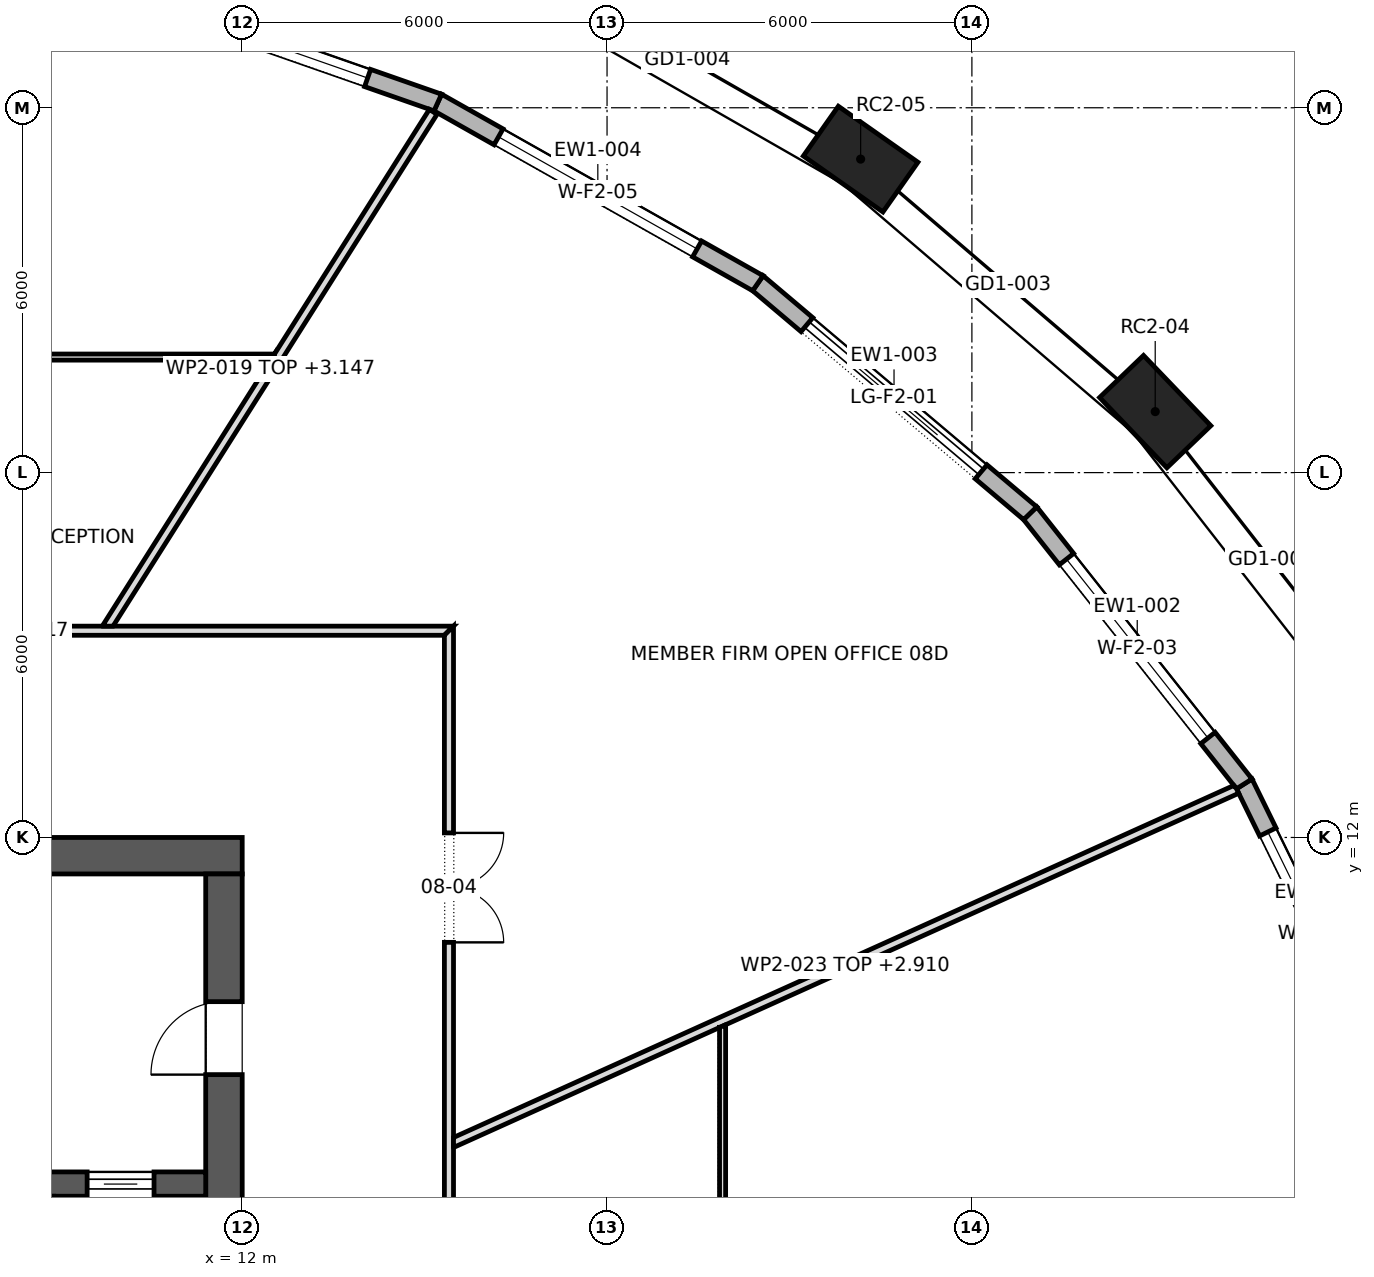
"""IFC4 building model, lengths in metres.
Left out: names, types, materials, properties, quantities, classifications, styles, units other than length and angle.
Written with IfcOpenShell. Run it as: python <this file> out.ifc"""

import sys

from ifc_helpers import new_model, si_unit, direction, frame, frame_2d, origin, origin_2d, place, context, subcontext, project, spatial, polyline, rectangle, outline, extrude, element, fill, save


model = new_model("IFC4")
c1 = context("Model", 3, precision=1e-05, world=origin(), true_north=direction((0.0, 1.0)))
c2 = subcontext(c1, "Body", "Model", "MODEL_VIEW")
j1 = project(units=[si_unit("LENGTHUNIT", "METRE"), si_unit("PLANEANGLEUNIT", "RADIAN")], contexts=[c1])
p1 = place(None, origin())
s1 = spatial("IfcSite", under=j1, at=p1, CompositionType="ELEMENT")
p2 = place(p1, origin())
s2 = spatial("IfcBuilding", under=s1, at=p2, CompositionType="ELEMENT")
p3 = place(p2, frame((0.0, 0.0, 117.1)))
s3 = spatial("IfcBuildingStorey", under=s2, at=p3, CompositionType="ELEMENT", Elevation=117.1)
for number, where, z_axis, x_axis in (
    (1, (27.015, 19.003, 0.0), (0.0, 0.0, 1.0), (-0.692, 0.722, 0.0)),
    (2, (22.17, 23.156, 0.0), (0.0, 0.0, 1.0), (-0.818, 0.575, 0.0)),
):
    element("IfcColumn", number, at=place(p3, frame(where, z_axis=z_axis, x_axis=x_axis)), inside=s3, PredefinedType="COLUMN", context=c2, shape_type="SweptSolid", body=[
        extrude(rectangle(XDim=1.6, YDim=1.0, at=origin_2d()), origin(), (0.0, 0.0, 1.0), 4.2),
    ])
p4 = place(p3, frame((-12.0, 11.7, 0.0), z_axis=(0.0, 0.0, 1.0), x_axis=(1.0, 0.0, 0.0)))
e3 = element("IfcWall", 3, at=p4, inside=s3, PredefinedType="SHEAR", context=c2, shape_type="SweptSolid", body=[
    extrude(rectangle(XDim=24.0, YDim=0.6, at=frame_2d((12.0, 0.0))), origin(), (0.0, 0.0, 1.0), 4.2),
])
p5 = place(p4, frame((9.225, 0.0, 0.0)))
e4 = element("IfcOpeningElement", 4, at=p5, cuts=e3, PredefinedType="OPENING", context=c2, shape_type="SweptSolid", body=[
    extrude(rectangle(XDim=0.9, YDim=2.1, at=frame_2d((0.45, 1.05))), frame((0.0, 0.312, 0.0), z_axis=(0.0, -1.0, 0.0), x_axis=(1.0, 0.0, 0.0)), (0.0, 0.0, 1.0), 0.624),
])
p6 = place(p4, frame((10.925, 0.0, 0.0)))
e5 = element("IfcOpeningElement", 5, at=p6, cuts=e3, PredefinedType="OPENING", context=c2, shape_type="SweptSolid", body=[
    extrude(rectangle(XDim=0.8, YDim=2.1, at=frame_2d((0.4, 1.05))), frame((0.0, 0.312, 0.0), z_axis=(0.0, -1.0, 0.0), x_axis=(1.0, 0.0, 0.0)), (0.0, 0.0, 1.0), 0.624),
])
p7 = place(p4, frame((4.2, 0.0, 0.0)))
e6 = element("IfcOpeningElement", 6, at=p7, cuts=e3, PredefinedType="OPENING", context=c2, shape_type="SweptSolid", body=[
    extrude(rectangle(XDim=0.8, YDim=2.1, at=frame_2d((0.4, 1.05))), frame((0.0, 0.312, 0.0), z_axis=(0.0, -1.0, 0.0), x_axis=(1.0, 0.0, 0.0)), (0.0, 0.0, 1.0), 0.624),
])
p8 = place(p4, frame((13.8, 0.0, 0.0)))
e7 = element("IfcOpeningElement", 7, at=p8, cuts=e3, PredefinedType="OPENING", context=c2, shape_type="SweptSolid", body=[
    extrude(rectangle(XDim=0.8, YDim=2.1, at=frame_2d((0.4, 1.05))), frame((0.0, 0.312, 0.0), z_axis=(0.0, -1.0, 0.0), x_axis=(1.0, 0.0, 0.0)), (0.0, 0.0, 1.0), 0.624),
])
p9 = place(p4, frame((16.6, 0.0, 0.0)))
e8 = element("IfcOpeningElement", 8, at=p9, cuts=e3, PredefinedType="OPENING", context=c2, shape_type="SweptSolid", body=[
    extrude(rectangle(XDim=0.8, YDim=2.1, at=frame_2d((0.4, 1.05))), frame((0.0, 0.312, 0.0), z_axis=(0.0, -1.0, 0.0), x_axis=(1.0, 0.0, 0.0)), (0.0, 0.0, 1.0), 0.624),
])
p10 = place(p3, frame((11.7, -11.4, 0.0), z_axis=(0.0, 0.0, 1.0), x_axis=(0.0, 1.0, 0.0)))
e9 = element("IfcWall", 9, at=p10, inside=s3, PredefinedType="SHEAR", context=c2, shape_type="SweptSolid", body=[
    extrude(rectangle(XDim=22.8, YDim=0.6, at=frame_2d((11.4, 0.0))), origin(), (0.0, 0.0, 1.0), 4.2),
])
p11 = place(p10, frame((10.2, 0.0, 0.0)))
e10 = element("IfcOpeningElement", 10, at=p11, cuts=e9, PredefinedType="OPENING", context=c2, shape_type="SweptSolid", body=[
    extrude(rectangle(XDim=2.4, YDim=2.1, at=frame_2d((1.2, 1.05))), frame((0.0, 0.312, 0.0), z_axis=(0.0, -1.0, 0.0), x_axis=(1.0, 0.0, 0.0)), (0.0, 0.0, 1.0), 0.624),
])
p12 = place(p10, frame((19.5, 0.0, 0.0)))
e11 = element("IfcOpeningElement", 11, at=p12, cuts=e9, PredefinedType="OPENING", context=c2, shape_type="SweptSolid", body=[
    extrude(rectangle(XDim=1.2, YDim=2.1, at=frame_2d((0.6, 1.05))), frame((0.0, 0.312, 0.0), z_axis=(0.0, -1.0, 0.0), x_axis=(1.0, 0.0, 0.0)), (0.0, 0.0, 1.0), 0.624),
])
p13 = place(p10, frame((2.1, 0.0, 0.0)))
e12 = element("IfcOpeningElement", 12, at=p13, cuts=e9, PredefinedType="OPENING", context=c2, shape_type="SweptSolid", body=[
    extrude(rectangle(XDim=1.2, YDim=2.1, at=frame_2d((0.6, 1.05))), frame((0.0, 0.312, 0.0), z_axis=(0.0, -1.0, 0.0), x_axis=(1.0, 0.0, 0.0)), (0.0, 0.0, 1.0), 0.624),
])
p14 = place(p3, frame((-11.4, 6.3, 0.0), z_axis=(0.0, 0.0, 1.0), x_axis=(1.0, 0.0, 0.0)))
e13 = element("IfcWall", 13, at=p14, inside=s3, PredefinedType="SHEAR", context=c2, shape_type="SweptSolid", body=[
    extrude(rectangle(XDim=22.8, YDim=0.4, at=frame_2d((11.4, 0.0))), origin(), (0.0, 0.0, 1.0), 4.2),
])
p15 = place(p14, frame((20.85, 0.0, 0.0)))
e14 = element("IfcOpeningElement", 14, at=p15, cuts=e13, PredefinedType="OPENING", context=c2, shape_type="SweptSolid", body=[
    extrude(rectangle(XDim=1.1, YDim=2.1, at=frame_2d((0.55, 1.05))), frame((0.0, 0.212, 0.0), z_axis=(0.0, -1.0, 0.0), x_axis=(1.0, 0.0, 0.0)), (0.0, 0.0, 1.0), 0.424),
])
p16 = place(p3, frame((8.75, 3.2, 0.0), z_axis=(0.0, 0.0, 1.0), x_axis=(0.0, 1.0, 0.0)))
e15 = element("IfcWall", 15, at=p16, inside=s3, PredefinedType="SHEAR", context=c2, shape_type="SweptSolid", body=[
    extrude(rectangle(XDim=2.9, YDim=0.3, at=frame_2d((1.45, 0.0))), origin(), (0.0, 0.0, 1.0), 4.2),
])
p17 = place(p3, frame((30.905, 7.934, 0.0), z_axis=(0.0, 0.0, 1.0), x_axis=(-0.440306401535, 0.897847577692, 0.0)))
e16 = element("IfcWall", 16, at=p17, inside=s3, PredefinedType="STANDARD", context=c2, shape_type="SweptSolid", body=[
    extrude(outline(polyline([(-0.017, -0.15), (5.527, -0.15), (5.494, 0.15), (0.017, 0.15), (-0.017, -0.15)])), origin(), (0.0, 0.0, 1.0), 3.9),
])
p18 = place(p17, frame((0.88, 0.0, 0.6)))
e17 = element("IfcOpeningElement", 17, at=p18, cuts=e16, PredefinedType="OPENING", context=c2, shape_type="SweptSolid", body=[
    extrude(rectangle(XDim=3.75, YDim=2.85, at=frame_2d((1.875, 1.425))), frame((0.0, 0.162, 0.0), z_axis=(0.0, -1.0, 0.0), x_axis=(1.0, 0.0, 0.0)), (0.0, 0.0, 1.0), 0.324),
])
p19 = place(p3, frame((28.479, 12.881, 0.0), z_axis=(0.0, 0.0, 1.0), x_axis=(-0.62038332391, 0.784298751379, 0.0)))
e18 = element("IfcWall", 18, at=p19, inside=s3, PredefinedType="STANDARD", context=c2, shape_type="SweptSolid", body=[
    extrude(outline(polyline([(-0.016, -0.15), (5.69, -0.15), (5.66, 0.15), (0.016, 0.15), (-0.016, -0.15)])), origin(), (0.0, 0.0, 1.0), 3.9),
])
p20 = place(p19, frame((0.962, 0.0, 0.6)))
e19 = element("IfcOpeningElement", 19, at=p20, cuts=e18, PredefinedType="OPENING", context=c2, shape_type="SweptSolid", body=[
    extrude(rectangle(XDim=3.75, YDim=2.85, at=frame_2d((1.875, 1.425))), frame((0.0, 0.162, 0.0), z_axis=(0.0, -1.0, 0.0), x_axis=(1.0, 0.0, 0.0)), (0.0, 0.0, 1.0), 0.324),
])
p21 = place(p3, frame((24.958, 17.332, 0.0), z_axis=(0.0, 0.0, 1.0), x_axis=(-0.763937302001, 0.645290476151, 0.0)))
e20 = element("IfcWall", 20, at=p21, inside=s3, PredefinedType="STANDARD", context=c2, shape_type="SweptSolid", body=[
    extrude(outline(polyline([(-0.015, -0.15), (5.876, -0.15), (5.848, 0.15), (0.015, 0.15), (-0.015, -0.15)])), origin(), (0.0, 0.0, 1.0), 3.9),
])
p22 = place(p21, frame((1.056, 0.0, 0.0)))
e21 = element("IfcOpeningElement", 21, at=p22, cuts=e20, PredefinedType="OPENING", context=c2, shape_type="SweptSolid", body=[
    extrude(rectangle(XDim=3.75, YDim=3.45, at=frame_2d((1.875, 1.725))), frame((0.0, 0.162, 0.0), z_axis=(0.0, -1.0, 0.0), x_axis=(1.0, 0.0, 0.0)), (0.0, 0.0, 1.0), 0.324),
])
p23 = place(p3, frame((20.48, 21.115, 0.0), z_axis=(0.0, 0.0, 1.0), x_axis=(-0.870858332497, 0.491534093142, 0.0)))
e22 = element("IfcWall", 22, at=p23, inside=s3, PredefinedType="STANDARD", context=c2, shape_type="SweptSolid", body=[
    extrude(outline(polyline([(-0.014, -0.15), (6.058, -0.15), (6.031, 0.15), (0.014, 0.15), (-0.014, -0.15)])), origin(), (0.0, 0.0, 1.0), 3.9),
])
p24 = place(p23, frame((1.147, 0.0, 0.6)))
e23 = element("IfcOpeningElement", 23, at=p24, cuts=e22, PredefinedType="OPENING", context=c2, shape_type="SweptSolid", body=[
    extrude(rectangle(XDim=3.75, YDim=2.85, at=frame_2d((1.875, 1.425))), frame((0.0, 0.162, 0.0), z_axis=(0.0, -1.0, 0.0), x_axis=(1.0, 0.0, 0.0)), (0.0, 0.0, 1.0), 0.324),
])
p25 = place(p3, frame((15.216, 24.086, 0.0), z_axis=(0.0, 0.0, 1.0), x_axis=(-0.94389706045, 0.330239820849, 0.0)))
e24 = element("IfcWall", 24, at=p25, inside=s3, PredefinedType="STANDARD", context=c2, shape_type="SweptSolid", body=[
    extrude(outline(polyline([(-0.013, -0.15), (6.207, -0.15), (6.182, 0.15), (0.013, 0.15), (-0.013, -0.15)])), origin(), (0.0, 0.0, 1.0), 3.9),
])
p26 = place(p25, frame((1.222, 0.0, 0.6)))
e25 = element("IfcOpeningElement", 25, at=p26, cuts=e24, PredefinedType="OPENING", context=c2, shape_type="SweptSolid", body=[
    extrude(rectangle(XDim=3.75, YDim=2.85, at=frame_2d((1.875, 1.425))), frame((0.0, 0.162, 0.0), z_axis=(0.0, -1.0, 0.0), x_axis=(1.0, 0.0, 0.0)), (0.0, 0.0, 1.0), 0.324),
])
p27 = place(p3, frame((-2.255, 19.9, 0.0), z_axis=(0.0, 0.0, 1.0), x_axis=(1.0, 0.0, 0.0)))
e26 = element("IfcWall", 26, at=p27, inside=s3, PredefinedType="PARTITIONING", context=c2, shape_type="SweptSolid", body=[
    extrude(outline(polyline([(0.011, -0.05), (1.479, -0.05), (2.947, -0.05), (4.415, -0.05), (4.415, -0.05), (4.515, -0.05), (4.515, -0.05), (6.216, -0.05), (7.917, -0.05), (9.619, -0.05), (11.32, -0.05), (13.021, -0.05), (14.723, -0.05), (14.775, 0.032), (14.775, 0.032), (14.786, 0.05), (14.786, 0.05), (12.938, 0.05), (11.089, 0.05), (9.241, 0.05), (7.393, 0.05), (5.545, 0.05), (3.697, 0.05), (1.848, 0.05), (0.0, 0.05), (0.0, 0.048), (0.011, -0.05)])), origin(), (0.0, 0.0, 1.0), 3.9),
])
p28 = place(p27, frame((9.205, 0.0, 0.0)))
e27 = element("IfcOpeningElement", 27, at=p28, cuts=e26, PredefinedType="OPENING", context=c2, shape_type="SweptSolid", body=[
    extrude(rectangle(XDim=0.9, YDim=2.1, at=frame_2d((0.45, 1.05))), frame((0.0, 0.062, 0.0), z_axis=(0.0, -1.0, 0.0), x_axis=(1.0, 0.0, 0.0)), (0.0, 0.0, 1.0), 0.124),
])
p29 = place(p3, frame((2.21, 15.4, 0.0), z_axis=(0.0, 0.0, 1.0), x_axis=(1.0, 0.0, 0.0)))
e28 = element("IfcWall", 28, at=p29, inside=s3, PredefinedType="PARTITIONING", context=c2, shape_type="SweptSolid", body=[
    extrude(outline(polyline([(0.0, -0.075), (1.874, -0.075), (3.747, -0.075), (5.621, -0.075), (7.494, -0.075), (9.368, -0.075), (11.241, -0.075), (13.115, -0.075), (13.265, 0.075), (11.37, 0.075), (9.475, 0.075), (7.58, 0.075), (5.685, 0.075), (3.79, 0.075), (1.895, 0.075), (0.0, 0.075), (0.0, -0.075)])), origin(), (0.0, 0.0, 1.0), 3.9),
])
p30 = place(p29, frame((3.265, 0.0, 0.0)))
e29 = element("IfcOpeningElement", 29, at=p30, cuts=e28, PredefinedType="OPENING", context=c2, shape_type="SweptSolid", body=[
    extrude(rectangle(XDim=1.0, YDim=2.1, at=frame_2d((0.5, 1.05))), frame((0.0, 0.087, 0.0), z_axis=(0.0, -1.0, 0.0), x_axis=(1.0, 0.0, 0.0)), (0.0, 0.0, 1.0), 0.174),
])
p31 = place(p3, frame((9.762, 15.435, 0.0), z_axis=(0.0, 0.0, 1.0), x_axis=(0.534830284385, 0.844959506074, 0.0)))
e30 = element("IfcWall", 30, at=p31, inside=s3, PredefinedType="PARTITIONING", context=c2, shape_type="SweptSolid", body=[
    extrude(outline(polyline([(10.057, 0.075), (8.47, 0.075), (6.883, 0.075), (5.295, 0.075), (5.211, 0.022), (5.177, 0.075), (3.452, 0.075), (1.726, 0.075), (0.0, 0.075), (0.0, 0.075), (0.095, -0.075), (2.087, -0.075), (4.08, -0.075), (6.072, -0.075), (8.064, -0.075), (10.057, -0.075), (10.057, 0.075)])), origin(), (0.0, 0.0, 1.0), 3.147),
])
p32 = place(p3, frame((15.4, -15.475, 0.0), z_axis=(0.0, 0.0, 1.0), x_axis=(0.0, 1.0, 0.0)))
e31 = element("IfcWall", 31, at=p32, inside=s3, PredefinedType="PARTITIONING", context=c2, shape_type="SweptSolid", body=[
    extrude(outline(polyline([(0.0, -0.075), (1.935, -0.075), (3.869, -0.075), (5.803, -0.075), (7.738, -0.075), (9.672, -0.075), (11.606, -0.075), (13.541, -0.075), (15.475, -0.075), (17.409, -0.075), (19.344, -0.075), (21.278, -0.075), (23.212, -0.075), (25.147, -0.075), (27.081, -0.075), (29.016, -0.075), (30.95, -0.075), (30.8, 0.075), (28.885, 0.075), (26.969, 0.075), (25.053, 0.075), (23.138, 0.075), (21.222, 0.075), (19.306, 0.075), (17.391, 0.075), (15.475, 0.075), (13.56, 0.075), (11.644, 0.075), (9.728, 0.075), (7.812, 0.075), (5.897, 0.075), (3.981, 0.075), (2.066, 0.075), (0.15, 0.075), (0.0, -0.075)])), origin(), (0.0, 0.0, 1.0), 3.9),
])
p33 = place(p32, frame((8.595, 0.0, 0.0)))
e32 = element("IfcOpeningElement", 32, at=p33, cuts=e31, PredefinedType="OPENING", context=c2, shape_type="SweptSolid", body=[
    extrude(rectangle(XDim=1.8, YDim=2.1, at=frame_2d((0.9, 1.05))), frame((0.0, 0.087, 0.0), z_axis=(0.0, -1.0, 0.0), x_axis=(1.0, 0.0, 0.0)), (0.0, 0.0, 1.0), 0.174),
])
p34 = place(p32, frame((17.81, 0.0, 0.0)))
e33 = element("IfcOpeningElement", 33, at=p34, cuts=e31, PredefinedType="OPENING", context=c2, shape_type="SweptSolid", body=[
    extrude(rectangle(XDim=1.0, YDim=2.1, at=frame_2d((0.5, 1.05))), frame((0.0, 0.087, 0.0), z_axis=(0.0, -1.0, 0.0), x_axis=(1.0, 0.0, 0.0)), (0.0, 0.0, 1.0), 0.174),
])
p35 = place(p32, frame((25.75, 0.0, 0.0)))
e34 = element("IfcOpeningElement", 34, at=p35, cuts=e31, PredefinedType="OPENING", context=c2, shape_type="SweptSolid", body=[
    extrude(rectangle(XDim=1.8, YDim=2.1, at=frame_2d((0.9, 1.05))), frame((0.0, 0.087, 0.0), z_axis=(0.0, -1.0, 0.0), x_axis=(1.0, 0.0, 0.0)), (0.0, 0.0, 1.0), 0.174),
])
p36 = place(p3, frame((15.444, 6.97, 0.0), z_axis=(0.0, 0.0, 1.0), x_axis=(0.911543819319, 0.411202949237, 0.0)))
e35 = element("IfcWall", 35, at=p36, inside=s3, PredefinedType="PARTITIONING", context=c2, shape_type="SweptSolid", body=[
    extrude(outline(polyline([(0.0, -0.075), (1.6, -0.075), (3.2, -0.075), (4.8, -0.075), (4.801, -0.073), (4.805, -0.075), (6.677, -0.075), (8.549, -0.075), (10.421, -0.075), (12.293, -0.075), (14.166, -0.075), (14.166, -0.063), (14.163, 0.007), (14.146, 0.075), (12.386, 0.075), (10.627, 0.075), (8.867, 0.075), (7.107, 0.075), (5.347, 0.075), (3.587, 0.075), (1.828, 0.075), (0.068, 0.075), (0.0, -0.075)])), origin(), (0.0, 0.0, 1.0), 2.91),
])
p37 = place(p3, frame((19.9, 8.92, 0.0), z_axis=(0.0, 0.0, 1.0), x_axis=(0.0, -1.0, 0.0)))
e36 = element("IfcWall", 36, at=p37, inside=s3, PredefinedType="PARTITIONING", context=c2, shape_type="SweptSolid", body=[
    extrude(outline(polyline([(0.045, -0.05), (1.787, -0.05), (3.529, -0.05), (5.271, -0.05), (7.012, -0.05), (8.754, -0.05), (10.496, -0.05), (10.504, 0.048), (10.504, 0.05), (8.754, 0.05), (7.003, 0.05), (5.252, 0.05), (3.501, 0.05), (1.751, 0.05), (0.0, 0.05), (0.0, 0.049), (0.045, -0.05)])), origin(), (0.0, 0.0, 1.0), 3.9),
])
p38 = place(p37, frame((4.81, 0.0, 0.0)))
e37 = element("IfcOpeningElement", 37, at=p38, cuts=e36, PredefinedType="OPENING", context=c2, shape_type="SweptSolid", body=[
    extrude(rectangle(XDim=0.9, YDim=2.1, at=frame_2d((0.45, 1.05))), frame((0.0, 0.062, 0.0), z_axis=(0.0, -1.0, 0.0), x_axis=(1.0, 0.0, 0.0)), (0.0, 0.0, 1.0), 0.124),
])
p39 = place(p18, origin())
e38 = element("IfcWindow", 38, at=p39, inside=s3, PartitioningType="TRIPLE_PANEL_VERTICAL", PredefinedType="WINDOW", context=c2, shape_type="SweptSolid", body=[
    extrude(rectangle(XDim=3.75, YDim=2.85, at=frame_2d((1.875, 1.425))), frame((0.0, 0.03, 0.0), z_axis=(0.0, -1.0, 0.0), x_axis=(1.0, 0.0, 0.0)), (0.0, 0.0, 1.0), 0.06),
])
fill(e17, e38)
p40 = place(p20, origin())
e39 = element("IfcWindow", 39, at=p40, inside=s3, PartitioningType="TRIPLE_PANEL_VERTICAL", PredefinedType="WINDOW", context=c2, shape_type="SweptSolid", body=[
    extrude(rectangle(XDim=3.75, YDim=2.85, at=frame_2d((1.875, 1.425))), frame((0.0, 0.03, 0.0), z_axis=(0.0, -1.0, 0.0), x_axis=(1.0, 0.0, 0.0)), (0.0, 0.0, 1.0), 0.06),
])
fill(e19, e39)
p41 = place(p22, origin())
e40 = element("IfcDoor", 40, at=p41, inside=s3, OperationType="DOUBLE_DOOR_SLIDING", PredefinedType="DOOR", context=c2, shape_type="SweptSolid", body=[
    extrude(rectangle(XDim=3.75, YDim=3.45, at=frame_2d((1.875, 1.725))), frame((0.0, 0.025, 0.0), z_axis=(0.0, -1.0, 0.0), x_axis=(1.0, 0.0, 0.0)), (0.0, 0.0, 1.0), 0.05),
])
fill(e21, e40)
p42 = place(p24, origin())
e41 = element("IfcWindow", 41, at=p42, inside=s3, PartitioningType="TRIPLE_PANEL_VERTICAL", PredefinedType="WINDOW", context=c2, shape_type="SweptSolid", body=[
    extrude(rectangle(XDim=3.75, YDim=2.85, at=frame_2d((1.875, 1.425))), frame((0.0, 0.03, 0.0), z_axis=(0.0, -1.0, 0.0), x_axis=(1.0, 0.0, 0.0)), (0.0, 0.0, 1.0), 0.06),
])
fill(e23, e41)
p43 = place(p26, origin())
e42 = element("IfcWindow", 42, at=p43, inside=s3, PartitioningType="TRIPLE_PANEL_VERTICAL", PredefinedType="WINDOW", context=c2, shape_type="SweptSolid", body=[
    extrude(rectangle(XDim=3.75, YDim=2.85, at=frame_2d((1.875, 1.425))), frame((0.0, 0.03, 0.0), z_axis=(0.0, -1.0, 0.0), x_axis=(1.0, 0.0, 0.0)), (0.0, 0.0, 1.0), 0.06),
])
fill(e25, e42)
p44 = place(p15, origin())
e43 = element("IfcDoor", 43, at=p44, inside=s3, OperationType="SLIDING_TO_LEFT", PredefinedType="DOOR", context=c2, shape_type="SweptSolid", body=[
    extrude(rectangle(XDim=1.1, YDim=2.1, at=frame_2d((0.55, 1.05))), frame((0.0, 0.025, 0.0), z_axis=(0.0, -1.0, 0.0), x_axis=(1.0, 0.0, 0.0)), (0.0, 0.0, 1.0), 0.05),
])
fill(e14, e43)
p45 = place(p12, origin())
e44 = element("IfcDoor", 44, at=p45, inside=s3, OperationType="SINGLE_SWING_RIGHT", PredefinedType="DOOR", context=c2, shape_type="SweptSolid", body=[
    extrude(rectangle(XDim=1.2, YDim=2.1, at=frame_2d((0.6, 1.05))), frame((0.0, 0.025, 0.0), z_axis=(0.0, -1.0, 0.0), x_axis=(1.0, 0.0, 0.0)), (0.0, 0.0, 1.0), 0.05),
])
fill(e11, e44)
p46 = place(p35, frame((1.8, 0.0, 0.0), z_axis=(0.0, 0.0, 1.0), x_axis=(-1.0, 0.0, 0.0)))
e45 = element("IfcDoor", 45, at=p46, inside=s3, OperationType="DOUBLE_DOOR_SINGLE_SWING", PredefinedType="DOOR", context=c2, shape_type="SweptSolid", body=[
    extrude(rectangle(XDim=1.8, YDim=2.1, at=frame_2d((0.9, 1.05))), frame((0.0, 0.025, 0.0), z_axis=(0.0, -1.0, 0.0), x_axis=(1.0, 0.0, 0.0)), (0.0, 0.0, 1.0), 0.05),
])
fill(e34, e45)
save(model, sys.argv[1])
